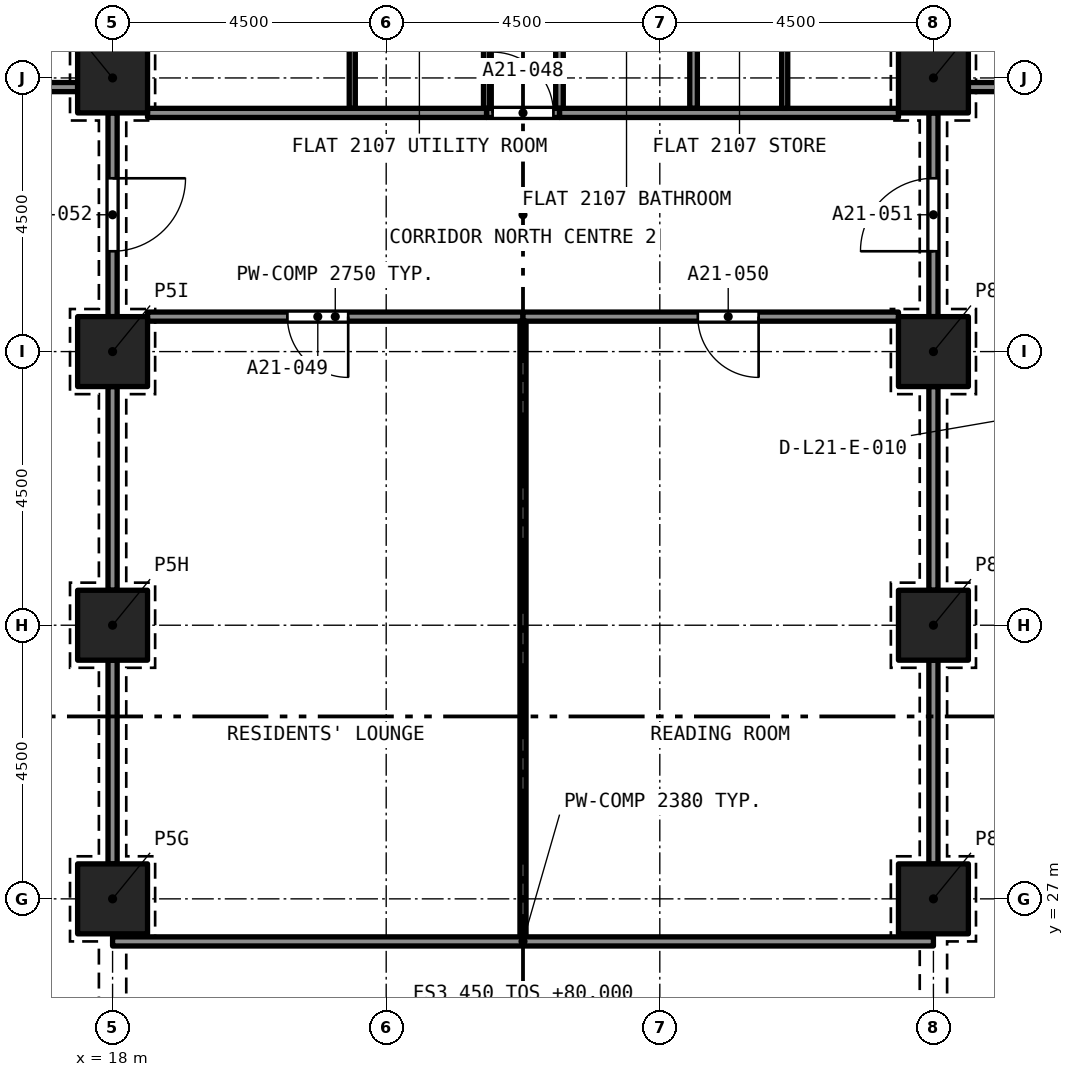
"""IFC4 building model, lengths in metres.
Left out: names, types, materials, properties, quantities, classifications, styles, units other than length and angle.
Written with IfcOpenShell. Run it as: python <this file> out.ifc"""

import sys

from ifc_helpers import new_model, si_unit, direction, frame, frame_2d, origin, origin_2d, place, context, subcontext, project, spatial, rectangle, extrude, element, fill, save


model = new_model("IFC4")
c1 = context("Model", 3, precision=1e-05, world=origin(), true_north=direction((0.0, 1.0)))
c2 = subcontext(c1, "Body", "Model", "MODEL_VIEW")
j1 = project(units=[si_unit("LENGTHUNIT", "METRE"), si_unit("PLANEANGLEUNIT", "RADIAN")], contexts=[c1])
p1 = place(None, origin())
s1 = spatial("IfcSite", under=j1, at=p1, CompositionType="ELEMENT")
p2 = place(p1, origin())
s2 = spatial("IfcBuilding", under=s1, at=p2, CompositionType="ELEMENT")
p3 = place(p2, frame((0.0, 0.0, 80.0)))
s3 = spatial("IfcBuildingStorey", under=s2, at=p3, CompositionType="ELEMENT", Elevation=80.0)
for number, where, z_axis, x_axis in (
    (1, (18.0, 27.0, 0.0), (0.0, 0.0, 1.0), (1.0, 0.0, 0.0)),
    (2, (31.5, 27.0, 0.0), (0.0, 0.0, 1.0), (1.0, 0.0, 0.0)),
    (3, (18.0, 31.5, 0.0), (0.0, 0.0, 1.0), (1.0, 0.0, 0.0)),
    (4, (31.5, 31.5, 0.0), (0.0, 0.0, 1.0), (1.0, 0.0, 0.0)),
    (5, (18.0, 36.0, 0.0), (0.0, 0.0, 1.0), (1.0, 0.0, 0.0)),
    (6, (31.5, 36.0, 0.0), (0.0, 0.0, 1.0), (1.0, 0.0, 0.0)),
    (7, (18.0, 40.5, 0.0), (0.0, 0.0, 1.0), (1.0, 0.0, 0.0)),
    (8, (31.5, 40.5, 0.0), (0.0, 0.0, 1.0), (1.0, 0.0, 0.0)),
):
    element("IfcColumn", number, at=place(p3, frame(where, z_axis=z_axis, x_axis=x_axis)), inside=s3, PredefinedType="COLUMN", context=c2, shape_type="SweptSolid", body=[
        extrude(rectangle(XDim=1.15, YDim=1.15, at=origin_2d()), origin(), (0.0, 0.0, 1.0), 3.2),
    ])
p4 = place(p3, frame((13.4, 40.35, 0.0), z_axis=(0.0, 0.0, 1.0), x_axis=(1.0, 0.0, 0.0)))
e9 = element("IfcWall", 9, at=p4, inside=s3, PredefinedType="PARTITIONING", context=c2, shape_type="SweptSolid", body=[
    extrude(rectangle(XDim=4.025, YDim=0.15, at=frame_2d((2.012, 0.0))), origin(), (0.0, 0.0, 1.0), 2.9),
])
p5 = place(p3, frame((32.075, 40.35, 0.0), z_axis=(0.0, 0.0, 1.0), x_axis=(1.0, 0.0, 0.0)))
e10 = element("IfcWall", 10, at=p5, inside=s3, PredefinedType="PARTITIONING", context=c2, shape_type="SweptSolid", body=[
    extrude(rectangle(XDim=2.275, YDim=0.15, at=frame_2d((1.138, 0.0))), origin(), (0.0, 0.0, 1.0), 2.9),
])
p6 = place(p5, frame((1.145, 0.0, 0.0)))
e11 = element("IfcOpeningElement", 11, at=p6, cuts=e10, PredefinedType="OPENING", context=c2, shape_type="SweptSolid", body=[
    extrude(rectangle(XDim=1.0, YDim=2.1, at=frame_2d((0.5, 1.05))), frame((0.0, 0.085, 0.0), z_axis=(0.0, -1.0, 0.0), x_axis=(1.0, 0.0, 0.0)), (0.0, 0.0, 1.0), 0.17),
])
for number, where, z_axis, x_axis in (
    (12, (25.35, 40.0, 0.0), (0.0, 0.0, 1.0), (0.0, 1.0, 0.0)),
    (13, (27.555, 40.0, 0.0), (0.0, 0.0, 1.0), (0.0, 1.0, 0.0)),
):
    element("IfcWall", number, at=place(p3, frame(where, z_axis=z_axis, x_axis=x_axis)), inside=s3, PredefinedType="PARTITIONING", context=c2, shape_type="SweptSolid", body=[
        extrude(rectangle(XDim=3.482, YDim=0.125, at=frame_2d((1.741, 0.0))), origin(), (0.0, 0.0, 1.0), 2.75),
    ])
p7 = place(p3, frame((25.35, 39.925, 0.0), z_axis=(0.0, 0.0, 1.0), x_axis=(1.0, 0.0, 0.0)))
e14 = element("IfcWall", 14, at=p7, inside=s3, PredefinedType="PARTITIONING", context=c2, shape_type="SweptSolid", body=[
    extrude(rectangle(XDim=5.575, YDim=0.15, at=frame_2d((2.788, 0.0))), origin(), (0.0, 0.0, 1.0), 2.75),
])
for number, where, z_axis, x_axis in (
    (15, (29.054, 40.0, 0.0), (0.0, 0.0, 1.0), (0.0, 1.0, 0.0)),
    (16, (24.15, 40.0, 0.0), (0.0, 0.0, 1.0), (0.0, 1.0, 0.0)),
):
    element("IfcWall", number, at=place(p3, frame(where, z_axis=z_axis, x_axis=x_axis)), inside=s3, PredefinedType="PARTITIONING", context=c2, shape_type="SweptSolid", body=[
        extrude(rectangle(XDim=3.495, YDim=0.1, at=frame_2d((1.748, 0.0))), origin(), (0.0, 0.0, 1.0), 2.75),
    ])
p8 = place(p3, frame((24.15, 39.925, 0.0), z_axis=(0.0, 0.0, 1.0), x_axis=(1.0, 0.0, 0.0)))
e17 = element("IfcWall", 17, at=p8, inside=s3, PredefinedType="PARTITIONING", context=c2, shape_type="SweptSolid", body=[
    extrude(rectangle(XDim=1.2, YDim=0.15, at=frame_2d((0.6, 0.0))), origin(), (0.0, 0.0, 1.0), 2.75),
])
p9 = place(p8, frame((0.1, 0.0, 0.0)))
e18 = element("IfcOpeningElement", 18, at=p9, cuts=e17, PredefinedType="OPENING", context=c2, shape_type="SweptSolid", body=[
    extrude(rectangle(XDim=1.0, YDim=2.1, at=frame_2d((0.5, 1.05))), frame((0.0, 0.085, 0.0), z_axis=(0.0, -1.0, 0.0), x_axis=(1.0, 0.0, 0.0)), (0.0, 0.0, 1.0), 0.17),
])
p10 = place(p3, frame((21.942, 40.0, 0.0), z_axis=(0.0, 0.0, 1.0), x_axis=(0.0, 1.0, 0.0)))
e19 = element("IfcWall", 19, at=p10, inside=s3, PredefinedType="PARTITIONING", context=c2, shape_type="SweptSolid", body=[
    extrude(rectangle(XDim=3.495, YDim=0.1, at=frame_2d((1.748, 0.0))), origin(), (0.0, 0.0, 1.0), 2.75),
])
p11 = place(p3, frame((18.575, 39.925, 0.0), z_axis=(0.0, 0.0, 1.0), x_axis=(1.0, 0.0, 0.0)))
e20 = element("IfcWall", 20, at=p11, inside=s3, PredefinedType="PARTITIONING", context=c2, shape_type="SweptSolid", body=[
    extrude(rectangle(XDim=5.575, YDim=0.15, at=frame_2d((2.788, 0.0))), origin(), (0.0, 0.0, 1.0), 2.75),
])
p12 = place(p3, frame((24.75, 36.575, 0.0), z_axis=(0.0, 0.0, 1.0), x_axis=(-1.0, 0.0, 0.0)))
e21 = element("IfcWall", 21, at=p12, inside=s3, PredefinedType="PARTITIONING", context=c2, shape_type="SweptSolid", body=[
    extrude(rectangle(XDim=6.175, YDim=0.15, at=frame_2d((3.087, 0.0))), origin(), (0.0, 0.0, 1.0), 2.75),
])
p13 = place(p12, frame((2.875, 0.0, 0.0)))
e22 = element("IfcOpeningElement", 22, at=p13, cuts=e21, PredefinedType="OPENING", context=c2, shape_type="SweptSolid", body=[
    extrude(rectangle(XDim=1.0, YDim=2.1, at=frame_2d((0.5, 1.05))), frame((0.0, 0.085, 0.0), z_axis=(0.0, -1.0, 0.0), x_axis=(1.0, 0.0, 0.0)), (0.0, 0.0, 1.0), 0.17),
])
p14 = place(p3, frame((30.925, 36.575, 0.0), z_axis=(0.0, 0.0, 1.0), x_axis=(-1.0, 0.0, 0.0)))
e23 = element("IfcWall", 23, at=p14, inside=s3, PredefinedType="PARTITIONING", context=c2, shape_type="SweptSolid", body=[
    extrude(rectangle(XDim=6.175, YDim=0.15, at=frame_2d((3.087, 0.0))), origin(), (0.0, 0.0, 1.0), 2.75),
])
p15 = place(p14, frame((2.3, 0.0, 0.0)))
e24 = element("IfcOpeningElement", 24, at=p15, cuts=e23, PredefinedType="OPENING", context=c2, shape_type="SweptSolid", body=[
    extrude(rectangle(XDim=1.0, YDim=2.1, at=frame_2d((0.5, 1.05))), frame((0.0, 0.085, 0.0), z_axis=(0.0, -1.0, 0.0), x_axis=(1.0, 0.0, 0.0)), (0.0, 0.0, 1.0), 0.17),
])
p16 = place(p3, frame((31.5, 36.575, 0.0), z_axis=(0.0, 0.0, 1.0), x_axis=(0.0, 1.0, 0.0)))
e25 = element("IfcWall", 25, at=p16, inside=s3, PredefinedType="PARTITIONING", context=c2, shape_type="SweptSolid", body=[
    extrude(rectangle(XDim=3.35, YDim=0.15, at=frame_2d((1.675, 0.0))), origin(), (0.0, 0.0, 1.0), 2.38),
])
p17 = place(p16, frame((1.075, 0.0, 0.0)))
e26 = element("IfcOpeningElement", 26, at=p17, cuts=e25, PredefinedType="OPENING", context=c2, shape_type="SweptSolid", body=[
    extrude(rectangle(XDim=1.2, YDim=2.1, at=frame_2d((0.6, 1.05))), frame((0.0, 0.085, 0.0), z_axis=(0.0, -1.0, 0.0), x_axis=(1.0, 0.0, 0.0)), (0.0, 0.0, 1.0), 0.17),
])
p18 = place(p3, frame((18.0, 39.925, 0.0), z_axis=(0.0, 0.0, 1.0), x_axis=(0.0, -1.0, 0.0)))
e27 = element("IfcWall", 27, at=p18, inside=s3, PredefinedType="PARTITIONING", context=c2, shape_type="SweptSolid", body=[
    extrude(rectangle(XDim=3.35, YDim=0.15, at=frame_2d((1.675, 0.0))), origin(), (0.0, 0.0, 1.0), 2.38),
])
p19 = place(p18, frame((1.075, 0.0, 0.0)))
e28 = element("IfcOpeningElement", 28, at=p19, cuts=e27, PredefinedType="OPENING", context=c2, shape_type="SweptSolid", body=[
    extrude(rectangle(XDim=1.2, YDim=2.1, at=frame_2d((0.6, 1.05))), frame((0.0, 0.085, 0.0), z_axis=(0.0, -1.0, 0.0), x_axis=(1.0, 0.0, 0.0)), (0.0, 0.0, 1.0), 0.17),
])
p20 = place(p3, frame((24.75, 26.375, 0.0), z_axis=(0.0, 0.0, 1.0), x_axis=(0.0, 1.0, 0.0)))
e29 = element("IfcWall", 29, at=p20, inside=s3, PredefinedType="PARTITIONING", context=c2, shape_type="SweptSolid", body=[
    extrude(rectangle(XDim=10.125, YDim=0.1, at=frame_2d((5.062, 0.0))), origin(), (0.0, 0.0, 1.0), 2.75),
])
for number, where, z_axis, x_axis in (
    (30, (18.0, 27.575, 0.0), (0.0, 0.0, 1.0), (0.0, 1.0, 0.0)),
    (31, (18.0, 32.075, 0.0), (0.0, 0.0, 1.0), (0.0, 1.0, 0.0)),
):
    element("IfcWall", number, at=place(p3, frame(where, z_axis=z_axis, x_axis=x_axis)), inside=s3, PredefinedType="PARTITIONING", context=c2, shape_type="SweptSolid", body=[
        extrude(rectangle(XDim=3.35, YDim=0.15, at=frame_2d((1.675, 0.0))), origin(), (0.0, 0.0, 1.0), 2.38),
    ])
p21 = place(p3, frame((18.0, 26.3, 0.0), z_axis=(0.0, 0.0, 1.0), x_axis=(1.0, 0.0, 0.0)))
e32 = element("IfcWall", 32, at=p21, inside=s3, PredefinedType="PARTITIONING", context=c2, shape_type="SweptSolid", body=[
    extrude(rectangle(XDim=13.5, YDim=0.15, at=frame_2d((6.75, 0.0))), origin(), (0.0, 0.0, 1.0), 2.38),
])
for number, where, z_axis, x_axis in (
    (33, (31.5, 32.075, 0.0), (0.0, 0.0, 1.0), (0.0, 1.0, 0.0)),
    (34, (31.5, 27.575, 0.0), (0.0, 0.0, 1.0), (0.0, 1.0, 0.0)),
):
    element("IfcWall", number, at=place(p3, frame(where, z_axis=z_axis, x_axis=x_axis)), inside=s3, PredefinedType="PARTITIONING", context=c2, shape_type="SweptSolid", body=[
        extrude(rectangle(XDim=3.35, YDim=0.15, at=frame_2d((1.675, 0.0))), origin(), (0.0, 0.0, 1.0), 2.38),
    ])
p22 = place(p9, origin())
e35 = element("IfcDoor", 35, at=p22, inside=s3, OperationType="SINGLE_SWING_RIGHT", PredefinedType="DOOR", context=c2, shape_type="SweptSolid", body=[
    extrude(rectangle(XDim=1.0, YDim=2.1, at=frame_2d((0.5, 1.05))), frame((0.0, 0.025, 0.0), z_axis=(0.0, -1.0, 0.0), x_axis=(1.0, 0.0, 0.0)), (0.0, 0.0, 1.0), 0.05),
])
fill(e18, e35)
p23 = place(p13, origin())
e36 = element("IfcDoor", 36, at=p23, inside=s3, OperationType="SINGLE_SWING_RIGHT", PredefinedType="DOOR", context=c2, shape_type="SweptSolid", body=[
    extrude(rectangle(XDim=1.0, YDim=2.1, at=frame_2d((0.5, 1.05))), frame((0.0, 0.025, 0.0), z_axis=(0.0, -1.0, 0.0), x_axis=(1.0, 0.0, 0.0)), (0.0, 0.0, 1.0), 0.05),
])
fill(e22, e36)
p24 = place(p15, origin())
e37 = element("IfcDoor", 37, at=p24, inside=s3, OperationType="SINGLE_SWING_LEFT", PredefinedType="DOOR", context=c2, shape_type="SweptSolid", body=[
    extrude(rectangle(XDim=1.0, YDim=2.1, at=frame_2d((0.5, 1.05))), frame((0.0, 0.025, 0.0), z_axis=(0.0, -1.0, 0.0), x_axis=(1.0, 0.0, 0.0)), (0.0, 0.0, 1.0), 0.05),
])
fill(e24, e37)
p25 = place(p17, origin())
e38 = element("IfcDoor", 38, at=p25, inside=s3, OperationType="SINGLE_SWING_LEFT", PredefinedType="DOOR", context=c2, shape_type="SweptSolid", body=[
    extrude(rectangle(XDim=1.2, YDim=2.1, at=frame_2d((0.6, 1.05))), frame((0.0, 0.025, 0.0), z_axis=(0.0, -1.0, 0.0), x_axis=(1.0, 0.0, 0.0)), (0.0, 0.0, 1.0), 0.05),
])
fill(e26, e38)
p26 = place(p19, origin())
e39 = element("IfcDoor", 39, at=p26, inside=s3, OperationType="SINGLE_SWING_LEFT", PredefinedType="DOOR", context=c2, shape_type="SweptSolid", body=[
    extrude(rectangle(XDim=1.2, YDim=2.1, at=frame_2d((0.6, 1.05))), frame((0.0, 0.025, 0.0), z_axis=(0.0, -1.0, 0.0), x_axis=(1.0, 0.0, 0.0)), (0.0, 0.0, 1.0), 0.05),
])
fill(e28, e39)
save(model, sys.argv[1])
